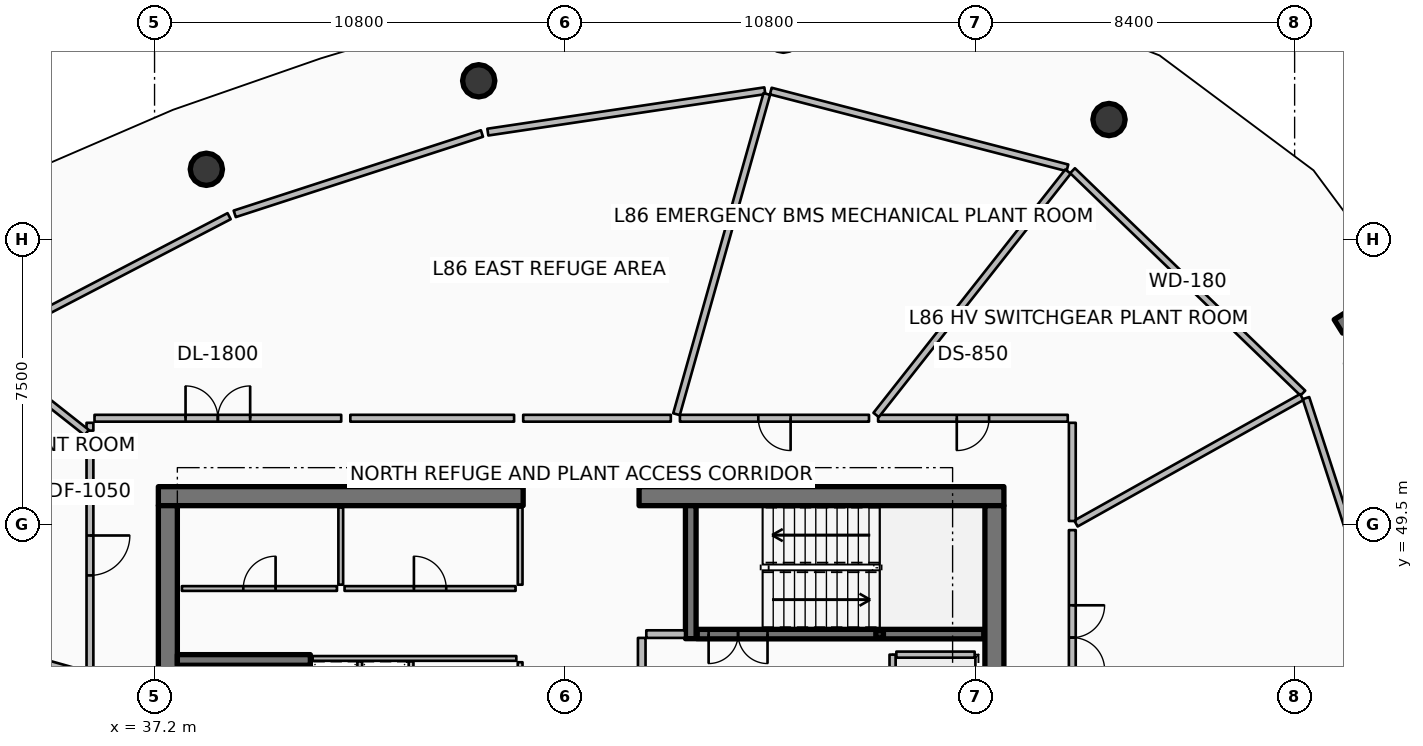
"""IFC4 building model, lengths in metres.
Left out: names, types, materials, properties, quantities, classifications, styles, units other than length and angle.
Written with IfcOpenShell. Run it as: python <this file> out.ifc"""

import sys

from ifc_helpers import new_model, si_unit, direction, frame, frame_2d, origin, origin_2d, place, context, subcontext, project, spatial, rectangle, hollow_rectangle, circle, extrude, element, fill, save


model = new_model("IFC4")
c1 = context("Model", 3, precision=1e-05, world=origin(), true_north=direction((0.0, 1.0)))
c2 = subcontext(c1, "Body", "Model", "MODEL_VIEW")
j1 = project(units=[si_unit("LENGTHUNIT", "METRE"), si_unit("PLANEANGLEUNIT", "RADIAN")], contexts=[c1])
p1 = place(None, origin())
s1 = spatial("IfcSite", under=j1, at=p1, CompositionType="ELEMENT")
p2 = place(p1, origin())
s2 = spatial("IfcBuilding", under=s1, at=p2, CompositionType="ELEMENT")
p3 = place(p2, frame((0.0, 0.0, 343.1)))
s3 = spatial("IfcBuildingStorey", under=s2, at=p3, CompositionType="ELEMENT", Elevation=343.1)
p4 = place(p3, frame((37.3, 50.25, 0.0), z_axis=(0.0, 0.0, 1.0), x_axis=(1.0, 0.0, 0.0)))
e1 = element("IfcWall", 1, at=p4, inside=s3, PredefinedType="SHEAR", context=c2, shape_type="SweptSolid", body=[
    extrude(rectangle(XDim=9.6, YDim=0.5, at=frame_2d((4.8, 0.0))), origin(), (0.0, 0.0, 1.0), 4.2),
])
p5 = place(p3, frame((49.95, 50.25, 0.0), z_axis=(0.0, 0.0, 1.0), x_axis=(1.0, 0.0, 0.0)))
e2 = element("IfcWall", 2, at=p5, inside=s3, PredefinedType="SHEAR", context=c2, shape_type="SweptSolid", body=[
    extrude(rectangle(XDim=9.6, YDim=0.5, at=frame_2d((4.8, 0.0))), origin(), (0.0, 0.0, 1.0), 4.2),
])
for number, where, z_axis, x_axis in (
    (3, (37.55, 34.0, 0.0), (0.0, 0.0, 1.0), (0.0, 1.0, 0.0)),
    (4, (59.3, 34.0, 0.0), (0.0, 0.0, 1.0), (0.0, 1.0, 0.0)),
):
    element("IfcWall", number, at=place(p3, frame(where, z_axis=z_axis, x_axis=x_axis)), inside=s3, PredefinedType="SHEAR", context=c2, shape_type="SweptSolid", body=[
        extrude(rectangle(XDim=16.0, YDim=0.5, at=frame_2d((8.0, 0.0))), origin(), (0.0, 0.0, 1.0), 4.2),
    ])
for number, where, z_axis, x_axis in (
    (5, (37.8, 45.94, 0.0), (0.0, 0.0, 1.0), (1.0, 0.0, 0.0)),
    (6, (51.31, 46.5, 0.0), (0.0, 0.0, 1.0), (0.0, 1.0, 0.0)),
):
    element("IfcWall", number, at=place(p3, frame(where, z_axis=z_axis, x_axis=x_axis)), inside=s3, PredefinedType="SHEAR", context=c2, shape_type="SweptSolid", body=[
        extrude(rectangle(XDim=3.5, YDim=0.28, at=frame_2d((1.75, 0.0))), origin(), (0.0, 0.0, 1.0), 4.2),
    ])
p6 = place(p3, frame((56.28, 46.62, 0.0), z_axis=(0.0, 0.0, 1.0), x_axis=(1.0, 0.0, 0.0)))
e7 = element("IfcColumn", 7, at=p6, inside=s3, PredefinedType="COLUMN", context=c2, shape_type="SweptSolid", body=[
    extrude(hollow_rectangle(XDim=0.2, YDim=0.2, WallThickness=0.01, InnerFilletRadius=0.01, OuterFilletRadius=0.02, at=origin_2d()), origin(), (0.0, 0.0, 1.0), 1.895),
])
p7 = place(p3, frame((68.353, 54.718, 0.0), z_axis=(0.0, 0.0, 1.0), x_axis=(0.848053161125, 0.529911158502, 0.0)))
e8 = element("IfcWall", 8, at=p7, inside=s3, PredefinedType="SOLIDWALL", context=c2, shape_type="SweptSolid", body=[
    extrude(rectangle(XDim=3.5, YDim=0.42, at=frame_2d((1.75, 0.0))), origin(), (0.0, 0.0, 1.0), 4.2),
])
for number, where, z_axis, x_axis in (
    (9, (62.316, 60.159, 0.0), (0.0, 0.0, 1.0), (1.0, 0.0, 0.0)),
    (10, (45.73, 61.179, 0.0), (0.0, 0.0, 1.0), (1.0, 0.0, 0.0)),
    (11, (38.563, 58.851, 0.0), (0.0, 0.0, 1.0), (1.0, 0.0, 0.0)),
):
    element("IfcColumn", number, at=place(p3, frame(where, z_axis=z_axis, x_axis=x_axis)), inside=s3, PredefinedType="COLUMN", context=c2, shape_type="SweptSolid", body=[
        extrude(circle(Radius=0.425, at=origin_2d()), origin(), (0.0, 0.0, 1.0), 3.94),
    ])
p8 = place(p3, frame((41.18, 38.22, 0.0), z_axis=(0.0, 0.0, 1.0), x_axis=(0.0, 1.0, 0.0)))
e12 = element("IfcWall", 12, at=p8, inside=s3, PredefinedType="SOLIDWALL", context=c2, shape_type="SweptSolid", body=[
    extrude(rectangle(XDim=7.56, YDim=0.25, at=frame_2d((3.78, 0.0))), origin(), (0.0, 0.0, 1.0), 3.94),
])
p9 = place(p8, frame((0.3, 0.0, 0.0)))
e13 = element("IfcOpeningElement", 13, at=p9, cuts=e12, PredefinedType="OPENING", context=c2, shape_type="SweptSolid", body=[
    extrude(rectangle(XDim=1.55, YDim=2.15, at=frame_2d((0.775, 1.075))), frame((0.0, 0.135, 0.0), z_axis=(0.0, -1.0, 0.0), x_axis=(1.0, 0.0, 0.0)), (0.0, 0.0, 1.0), 0.27),
])
p10 = place(p3, frame((51.48, 46.62, 0.0), z_axis=(0.0, 0.0, 1.0), x_axis=(1.0, 0.0, 0.0)))
e14 = element("IfcWall", 14, at=p10, inside=s3, PredefinedType="SOLIDWALL", context=c2, shape_type="SweptSolid", body=[
    extrude(rectangle(XDim=7.54, YDim=0.25, at=frame_2d((3.77, 0.0))), origin(), (0.0, 0.0, 1.0), 3.94),
])
p11 = place(p10, frame((0.3, 0.0, 0.0)))
e15 = element("IfcOpeningElement", 15, at=p11, cuts=e14, PredefinedType="OPENING", context=c2, shape_type="SweptSolid", body=[
    extrude(rectangle(XDim=1.55, YDim=2.15, at=frame_2d((0.775, 1.075))), frame((0.0, 0.135, 0.0), z_axis=(0.0, -1.0, 0.0), x_axis=(1.0, 0.0, 0.0)), (0.0, 0.0, 1.0), 0.27),
])
p12 = place(p3, frame((56.62, 46.08, 0.0), z_axis=(0.0, 0.0, 1.0), x_axis=(0.0, -1.0, 0.0)))
e16 = element("IfcWall", 16, at=p12, inside=s3, PredefinedType="PARTITIONING", context=c2, shape_type="SweptSolid", body=[
    extrude(rectangle(XDim=2.46, YDim=0.16, at=frame_2d((1.23, 0.0))), origin(), (0.0, 0.0, 1.0), 3.94),
])
p13 = place(p12, frame((0.68, 0.0, 0.0)))
e17 = element("IfcOpeningElement", 17, at=p13, cuts=e16, PredefinedType="OPENING", context=c2, shape_type="SweptSolid", body=[
    extrude(rectangle(XDim=1.1, YDim=2.1, at=frame_2d((0.55, 1.05))), frame((0.0, 0.09, 0.0), z_axis=(0.0, -1.0, 0.0), x_axis=(1.0, 0.0, 0.0)), (0.0, 0.0, 1.0), 0.18),
])
p14 = place(p3, frame((56.72, 46.08, 0.0), z_axis=(0.0, 0.0, 1.0), x_axis=(1.0, 0.0, 0.0)))
e18 = element("IfcWall", 18, at=p14, inside=s3, PredefinedType="PARTITIONING", context=c2, shape_type="SweptSolid", body=[
    extrude(rectangle(XDim=2.06, YDim=0.16, at=frame_2d((1.03, 0.0))), origin(), (0.0, 0.0, 1.0), 3.94),
])
for number, where, z_axis, x_axis in (
    (19, (46.82, 47.92, 0.0), (0.0, 0.0, 1.0), (0.0, 1.0, 0.0)),
    (20, (42.1, 47.92, 0.0), (0.0, 0.0, 1.0), (0.0, 1.0, 0.0)),
):
    element("IfcWall", number, at=place(p3, frame(where, z_axis=z_axis, x_axis=x_axis)), inside=s3, PredefinedType="PARTITIONING", context=c2, shape_type="SweptSolid", body=[
        extrude(rectangle(XDim=2.03, YDim=0.125, at=frame_2d((1.015, 0.0))), origin(), (0.0, 0.0, 1.0), 3.38),
    ])
p15 = place(p3, frame((37.92, 47.82, 0.0), z_axis=(0.0, 0.0, 1.0), x_axis=(1.0, 0.0, 0.0)))
e21 = element("IfcWall", 21, at=p15, inside=s3, PredefinedType="PARTITIONING", context=c2, shape_type="SweptSolid", body=[
    extrude(rectangle(XDim=4.08, YDim=0.125, at=frame_2d((2.04, 0.0))), origin(), (0.0, 0.0, 1.0), 3.38),
])
p16 = place(p15, frame((1.615, 0.0, 0.0)))
e22 = element("IfcOpeningElement", 22, at=p16, cuts=e21, PredefinedType="OPENING", context=c2, shape_type="SweptSolid", body=[
    extrude(rectangle(XDim=0.85, YDim=2.06, at=frame_2d((0.425, 1.03))), frame((0.0, 0.073, 0.0), z_axis=(0.0, -1.0, 0.0), x_axis=(1.0, 0.0, 0.0)), (0.0, 0.0, 1.0), 0.145),
])
p17 = place(p3, frame((42.2, 47.82, 0.0), z_axis=(0.0, 0.0, 1.0), x_axis=(1.0, 0.0, 0.0)))
e23 = element("IfcWall", 23, at=p17, inside=s3, PredefinedType="PARTITIONING", context=c2, shape_type="SweptSolid", body=[
    extrude(rectangle(XDim=4.5, YDim=0.125, at=frame_2d((2.25, 0.0))), origin(), (0.0, 0.0, 1.0), 3.38),
])
p18 = place(p17, frame((1.825, 0.0, 0.0)))
e24 = element("IfcOpeningElement", 24, at=p18, cuts=e23, PredefinedType="OPENING", context=c2, shape_type="SweptSolid", body=[
    extrude(rectangle(XDim=0.85, YDim=2.06, at=frame_2d((0.425, 1.03))), frame((0.0, 0.073, 0.0), z_axis=(0.0, -1.0, 0.0), x_axis=(1.0, 0.0, 0.0)), (0.0, 0.0, 1.0), 0.145),
])
p19 = place(p3, frame((50.14, 46.62, 0.0), z_axis=(0.0, 0.0, 1.0), x_axis=(1.0, 0.0, 0.0)))
e25 = element("IfcWall", 25, at=p19, inside=s3, PredefinedType="PARTITIONING", context=c2, shape_type="SweptSolid", body=[
    extrude(rectangle(XDim=1.02, YDim=0.2, at=frame_2d((0.51, 0.0))), origin(), (0.0, 0.0, 1.0), 3.94),
])
p20 = place(p3, frame((50.02, 43.22, 0.0), z_axis=(0.0, 0.0, 1.0), x_axis=(0.0, 1.0, 0.0)))
e26 = element("IfcWall", 26, at=p20, inside=s3, PredefinedType="PARTITIONING", context=c2, shape_type="SweptSolid", body=[
    extrude(rectangle(XDim=3.3, YDim=0.2, at=frame_2d((1.65, 0.0))), origin(), (0.0, 0.0, 1.0), 3.94),
])
p21 = place(p20, frame((1.125, 0.0, 0.0)))
e27 = element("IfcOpeningElement", 27, at=p21, cuts=e26, PredefinedType="OPENING", context=c2, shape_type="SweptSolid", body=[
    extrude(rectangle(XDim=1.05, YDim=2.1, at=frame_2d((0.525, 1.05))), frame((0.0, 0.11, 0.0), z_axis=(0.0, -1.0, 0.0), x_axis=(1.0, 0.0, 0.0)), (0.0, 0.0, 1.0), 0.22),
])
p22 = place(p3, frame((41.36, 45.98, 0.0), z_axis=(0.0, 0.0, 1.0), x_axis=(1.0, 0.0, 0.0)))
e28 = element("IfcWall", 28, at=p22, inside=s3, PredefinedType="PARTITIONING", context=c2, shape_type="SweptSolid", body=[
    extrude(rectangle(XDim=5.36, YDim=0.125, at=frame_2d((2.68, 0.0))), origin(), (0.0, 0.0, 1.0), 3.38),
])
p23 = place(p3, frame((42.6, 44.35, 0.0), z_axis=(0.0, 0.0, 1.0), x_axis=(0.0, 1.0, 0.0)))
e29 = element("IfcWall", 29, at=p23, inside=s3, PredefinedType="PARTITIONING", context=c2, shape_type="SweptSolid", body=[
    extrude(rectangle(XDim=1.55, YDim=0.125, at=frame_2d((0.775, 0.0))), origin(), (0.0, 0.0, 1.0), 3.38),
])
p24 = place(p3, frame((43.95, 41.58, 0.0), z_axis=(0.0, 0.0, 1.0), x_axis=(0.0, 1.0, 0.0)))
e30 = element("IfcWall", 30, at=p24, inside=s3, PredefinedType="PARTITIONING", context=c2, shape_type="SweptSolid", body=[
    extrude(rectangle(XDim=4.32, YDim=0.125, at=frame_2d((2.16, 0.0))), origin(), (0.0, 0.0, 1.0), 3.38),
])
p25 = place(p3, frame((46.82, 43.83, 0.0), z_axis=(0.0, 0.0, 1.0), x_axis=(0.0, 1.0, 0.0)))
e31 = element("IfcWall", 31, at=p25, inside=s3, PredefinedType="PARTITIONING", context=c2, shape_type="SweptSolid", body=[
    extrude(rectangle(XDim=2.05, YDim=0.125, at=frame_2d((1.025, 0.0))), origin(), (0.0, 0.0, 1.0), 3.38),
])
p26 = place(p25, frame((0.6, 0.0, 0.0)))
e32 = element("IfcOpeningElement", 32, at=p26, cuts=e31, PredefinedType="OPENING", context=c2, shape_type="SweptSolid", body=[
    extrude(rectangle(XDim=0.85, YDim=2.06, at=frame_2d((0.425, 1.03))), frame((0.0, 0.073, 0.0), z_axis=(0.0, -1.0, 0.0), x_axis=(1.0, 0.0, 0.0)), (0.0, 0.0, 1.0), 0.145),
])
p27 = place(p3, frame((67.417, 52.962, 0.0), z_axis=(0.0, 0.0, 1.0), x_axis=(-0.719358516059, 0.694638989241, 0.0)))
e33 = element("IfcWall", 33, at=p27, inside=s3, PredefinedType="PARTITIONING", context=c2, shape_type="SweptSolid", body=[
    extrude(rectangle(XDim=8.425, YDim=0.18, at=frame_2d((4.212, 0.0))), origin(), (0.0, 0.0, 1.0), 2.933),
])
p28 = place(p3, frame((61.221, 58.889, 0.0), z_axis=(0.0, 0.0, 1.0), x_axis=(-0.96812020229, 0.250486075298, 0.0)))
e34 = element("IfcWall", 34, at=p28, inside=s3, PredefinedType="PARTITIONING", context=c2, shape_type="SweptSolid", body=[
    extrude(rectangle(XDim=8.062, YDim=0.18, at=frame_2d((4.031, 0.0))), origin(), (0.0, 0.0, 1.0), 2.933),
])
p29 = place(p3, frame((53.26, 60.917, 0.0), z_axis=(0.0, 0.0, 1.0), x_axis=(-0.989035992024, -0.147674664315, 0.0)))
e35 = element("IfcWall", 35, at=p29, inside=s3, PredefinedType="PARTITIONING", context=c2, shape_type="SweptSolid", body=[
    extrude(rectangle(XDim=7.37, YDim=0.18, at=frame_2d((3.685, 0.0))), origin(), (0.0, 0.0, 1.0), 2.933),
])
p30 = place(p3, frame((45.815, 59.792, 0.0), z_axis=(0.0, 0.0, 1.0), x_axis=(-0.95105793387, -0.309012631495, 0.0)))
e36 = element("IfcWall", 36, at=p30, inside=s3, PredefinedType="PARTITIONING", context=c2, shape_type="SweptSolid", body=[
    extrude(rectangle(XDim=6.84, YDim=0.18, at=frame_2d((3.42, 0.0))), origin(), (0.0, 0.0, 1.0), 2.933),
])
p31 = place(p3, frame((39.163, 57.617, 0.0), z_axis=(0.0, 0.0, 1.0), x_axis=(-0.886951970108, -0.461861670548, 0.0)))
e37 = element("IfcWall", 37, at=p31, inside=s3, PredefinedType="PARTITIONING", context=c2, shape_type="SweptSolid", body=[
    extrude(rectangle(XDim=7.37, YDim=0.18, at=frame_2d((3.685, 0.0))), origin(), (0.0, 0.0, 1.0), 2.933),
])
p32 = place(p3, frame((70.141, 44.699, 0.0), z_axis=(0.0, 0.0, 1.0), x_axis=(-0.309030537088, 0.951052115894, 0.0)))
e38 = element("IfcWall", 38, at=p32, inside=s3, PredefinedType="PARTITIONING", context=c2, shape_type="SweptSolid", body=[
    extrude(rectangle(XDim=8.549, YDim=0.18, at=frame_2d((4.274, 0.0))), origin(), (0.0, 0.0, 1.0), 2.933),
])
p33 = place(p3, frame((50.785, 52.3, 0.0), z_axis=(0.0, 0.0, 1.0), x_axis=(-1.0, 0.0, 0.0)))
e39 = element("IfcWall", 39, at=p33, inside=s3, PredefinedType="PARTITIONING", context=c2, shape_type="SweptSolid", body=[
    extrude(rectangle(XDim=3.884, YDim=0.18, at=frame_2d((1.942, 0.0))), origin(), (0.0, 0.0, 1.0), 2.933),
])
p34 = place(p3, frame((46.661, 52.3, 0.0), z_axis=(0.0, 0.0, 1.0), x_axis=(-1.0, 0.0, 0.0)))
e40 = element("IfcWall", 40, at=p34, inside=s3, PredefinedType="PARTITIONING", context=c2, shape_type="SweptSolid", body=[
    extrude(rectangle(XDim=4.309, YDim=0.18, at=frame_2d((2.155, 0.0))), origin(), (0.0, 0.0, 1.0), 2.933),
])
p35 = place(p3, frame((42.112, 52.3, 0.0), z_axis=(0.0, 0.0, 1.0), x_axis=(-1.0, 0.0, 0.0)))
e41 = element("IfcWall", 41, at=p35, inside=s3, PredefinedType="PARTITIONING", context=c2, shape_type="SweptSolid", body=[
    extrude(rectangle(XDim=6.492, YDim=0.18, at=frame_2d((3.246, 0.0))), origin(), (0.0, 0.0, 1.0), 2.933),
])
p36 = place(p35, frame((2.396, 0.0, 0.0)))
e42 = element("IfcOpeningElement", 42, at=p36, cuts=e41, PredefinedType="OPENING", context=c2, shape_type="SweptSolid", body=[
    extrude(rectangle(XDim=1.7, YDim=2.15, at=frame_2d((0.85, 1.075))), frame((0.0, 0.1, 0.0), z_axis=(0.0, -1.0, 0.0), x_axis=(1.0, 0.0, 0.0)), (0.0, 0.0, 1.0), 0.2),
])
p37 = place(p3, frame((35.5, 52.18, 0.0), z_axis=(0.0, 0.0, 1.0), x_axis=(0.0, -1.0, 0.0)))
e43 = element("IfcWall", 43, at=p37, inside=s3, PredefinedType="PARTITIONING", context=c2, shape_type="SweptSolid", body=[
    extrude(rectangle(XDim=0.206, YDim=0.18, at=frame_2d((0.103, 0.0))), origin(), (0.0, 0.0, 1.0), 2.933),
])
p38 = place(p3, frame((50.935, 52.406, 0.0), z_axis=(0.0, 0.0, 1.0), x_axis=(0.271427049977, 0.962459015512, 0.0)))
e44 = element("IfcWall", 44, at=p38, inside=s3, PredefinedType="PARTITIONING", context=c2, shape_type="SweptSolid", body=[
    extrude(rectangle(XDim=8.755, YDim=0.18, at=frame_2d((4.378, 0.0))), origin(), (0.0, 0.0, 1.0), 2.933),
])
p39 = place(p3, frame((35.414, 51.922, 0.0), z_axis=(0.0, 0.0, 1.0), x_axis=(-0.78533621982, 0.619069480622, 0.0)))
e45 = element("IfcWall", 45, at=p39, inside=s3, PredefinedType="PARTITIONING", context=c2, shape_type="SweptSolid", body=[
    extrude(rectangle(XDim=3.54, YDim=0.18, at=frame_2d((1.77, 0.0))), origin(), (0.0, 0.0, 1.0), 2.933),
])
p40 = place(p3, frame((35.5, 51.734, 0.0), z_axis=(0.0, 0.0, 1.0), x_axis=(0.0, -1.0, 0.0)))
e46 = element("IfcWall", 46, at=p40, inside=s3, PredefinedType="PARTITIONING", context=c2, shape_type="SweptSolid", body=[
    extrude(rectangle(XDim=6.089, YDim=0.18, at=frame_2d((3.044, 0.0))), origin(), (0.0, 0.0, 1.0), 2.933),
])
p41 = place(p40, frame((2.519, 0.0, 0.0)))
e47 = element("IfcOpeningElement", 47, at=p41, cuts=e46, PredefinedType="OPENING", context=c2, shape_type="SweptSolid", body=[
    extrude(rectangle(XDim=1.05, YDim=2.1, at=frame_2d((0.525, 1.05))), frame((0.0, 0.1, 0.0), z_axis=(0.0, -1.0, 0.0), x_axis=(1.0, 0.0, 0.0)), (0.0, 0.0, 1.0), 0.2),
])
p42 = place(p3, frame((35.394, 45.555, 0.0), z_axis=(0.0, 0.0, 1.0), x_axis=(-0.962460337435, 0.2714223625, 0.0)))
e48 = element("IfcWall", 48, at=p42, inside=s3, PredefinedType="PARTITIONING", context=c2, shape_type="SweptSolid", body=[
    extrude(rectangle(XDim=8.283, YDim=0.18, at=frame_2d((4.142, 0.0))), origin(), (0.0, 0.0, 1.0), 2.933),
])
p43 = place(p3, frame((61.35, 43.7, 0.0), z_axis=(0.0, 0.0, 1.0), x_axis=(0.0, 1.0, 0.0)))
e49 = element("IfcWall", 49, at=p43, inside=s3, PredefinedType="PARTITIONING", context=c2, shape_type="SweptSolid", body=[
    extrude(rectangle(XDim=5.656, YDim=0.18, at=frame_2d((2.828, 0.0))), origin(), (0.0, 0.0, 1.0), 2.933),
])
p44 = place(p43, frame((1.978, 0.0, 0.0)))
e50 = element("IfcOpeningElement", 50, at=p44, cuts=e49, PredefinedType="OPENING", context=c2, shape_type="SweptSolid", body=[
    extrude(rectangle(XDim=1.7, YDim=2.15, at=frame_2d((0.85, 1.075))), frame((0.0, 0.1, 0.0), z_axis=(0.0, -1.0, 0.0), x_axis=(1.0, 0.0, 0.0)), (0.0, 0.0, 1.0), 0.2),
])
p45 = place(p3, frame((61.446, 49.53, 0.0), z_axis=(0.0, 0.0, 1.0), x_axis=(0.872491341717, 0.488629571995, 0.0)))
e51 = element("IfcWall", 51, at=p45, inside=s3, PredefinedType="PARTITIONING", context=c2, shape_type="SweptSolid", body=[
    extrude(rectangle(XDim=6.809, YDim=0.18, at=frame_2d((3.405, 0.0))), origin(), (0.0, 0.0, 1.0), 2.933),
])
p46 = place(p3, frame((61.35, 49.596, 0.0), z_axis=(0.0, 0.0, 1.0), x_axis=(0.0, 1.0, 0.0)))
e52 = element("IfcWall", 52, at=p46, inside=s3, PredefinedType="PARTITIONING", context=c2, shape_type="SweptSolid", body=[
    extrude(rectangle(XDim=2.583, YDim=0.18, at=frame_2d((1.292, 0.0))), origin(), (0.0, 0.0, 1.0), 2.933),
])
p47 = place(p3, frame((61.23, 52.3, 0.0), z_axis=(0.0, 0.0, 1.0), x_axis=(-1.0, 0.0, 0.0)))
e53 = element("IfcWall", 53, at=p47, inside=s3, PredefinedType="PARTITIONING", context=c2, shape_type="SweptSolid", body=[
    extrude(rectangle(XDim=4.99, YDim=0.18, at=frame_2d((2.495, 0.0))), origin(), (0.0, 0.0, 1.0), 2.933),
])
p48 = place(p47, frame((2.07, 0.0, 0.0)))
e54 = element("IfcOpeningElement", 54, at=p48, cuts=e53, PredefinedType="OPENING", context=c2, shape_type="SweptSolid", body=[
    extrude(rectangle(XDim=0.85, YDim=2.06, at=frame_2d((0.425, 1.03))), frame((0.0, 0.1, 0.0), z_axis=(0.0, -1.0, 0.0), x_axis=(1.0, 0.0, 0.0)), (0.0, 0.0, 1.0), 0.2),
])
p49 = place(p3, frame((56.188, 52.386, 0.0), z_axis=(0.0, 0.0, 1.0), x_axis=(0.619086016157, 0.785323184809, 0.0)))
e55 = element("IfcWall", 55, at=p49, inside=s3, PredefinedType="PARTITIONING", context=c2, shape_type="SweptSolid", body=[
    extrude(rectangle(XDim=8.155, YDim=0.18, at=frame_2d((4.078, 0.0))), origin(), (0.0, 0.0, 1.0), 2.933),
])
p50 = place(p3, frame((56.0, 52.3, 0.0), z_axis=(0.0, 0.0, 1.0), x_axis=(-1.0, 0.0, 0.0)))
e56 = element("IfcWall", 56, at=p50, inside=s3, PredefinedType="PARTITIONING", context=c2, shape_type="SweptSolid", body=[
    extrude(rectangle(XDim=4.975, YDim=0.18, at=frame_2d((2.488, 0.0))), origin(), (0.0, 0.0, 1.0), 2.933),
])
p51 = place(p50, frame((2.062, 0.0, 0.0)))
e57 = element("IfcOpeningElement", 57, at=p51, cuts=e56, PredefinedType="OPENING", context=c2, shape_type="SweptSolid", body=[
    extrude(rectangle(XDim=0.85, YDim=2.06, at=frame_2d((0.425, 1.03))), frame((0.0, 0.1, 0.0), z_axis=(0.0, -1.0, 0.0), x_axis=(1.0, 0.0, 0.0)), (0.0, 0.0, 1.0), 0.2),
])
p52 = place(p11, origin())
e58 = element("IfcDoor", 58, at=p52, inside=s3, OperationType="DOUBLE_DOOR_SINGLE_SWING", PredefinedType="DOOR", context=c2, shape_type="SweptSolid", body=[
    extrude(rectangle(XDim=1.55, YDim=2.15, at=frame_2d((0.775, 1.075))), frame((0.0, 0.025, 0.0), z_axis=(0.0, -1.0, 0.0), x_axis=(1.0, 0.0, 0.0)), (0.0, 0.0, 1.0), 0.05),
])
fill(e15, e58)
p53 = place(p16, origin())
e59 = element("IfcDoor", 59, at=p53, inside=s3, OperationType="SINGLE_SWING_RIGHT", PredefinedType="DOOR", context=c2, shape_type="SweptSolid", body=[
    extrude(rectangle(XDim=0.85, YDim=2.06, at=frame_2d((0.425, 1.03))), frame((0.0, 0.025, 0.0), z_axis=(0.0, -1.0, 0.0), x_axis=(1.0, 0.0, 0.0)), (0.0, 0.0, 1.0), 0.05),
])
fill(e22, e59)
p54 = place(p18, origin())
e60 = element("IfcDoor", 60, at=p54, inside=s3, OperationType="SINGLE_SWING_LEFT", PredefinedType="DOOR", context=c2, shape_type="SweptSolid", body=[
    extrude(rectangle(XDim=0.85, YDim=2.06, at=frame_2d((0.425, 1.03))), frame((0.0, 0.025, 0.0), z_axis=(0.0, -1.0, 0.0), x_axis=(1.0, 0.0, 0.0)), (0.0, 0.0, 1.0), 0.05),
])
fill(e24, e60)
p55 = place(p36, origin())
e61 = element("IfcDoor", 61, at=p55, inside=s3, OperationType="DOUBLE_DOOR_SINGLE_SWING", PredefinedType="DOOR", context=c2, shape_type="SweptSolid", body=[
    extrude(rectangle(XDim=1.7, YDim=2.15, at=frame_2d((0.85, 1.075))), frame((0.0, 0.025, 0.0), z_axis=(0.0, -1.0, 0.0), x_axis=(1.0, 0.0, 0.0)), (0.0, 0.0, 1.0), 0.05),
])
fill(e42, e61)
p56 = place(p41, origin())
e62 = element("IfcDoor", 62, at=p56, inside=s3, OperationType="SINGLE_SWING_LEFT", PredefinedType="DOOR", context=c2, shape_type="SweptSolid", body=[
    extrude(rectangle(XDim=1.05, YDim=2.1, at=frame_2d((0.525, 1.05))), frame((0.0, 0.025, 0.0), z_axis=(0.0, -1.0, 0.0), x_axis=(1.0, 0.0, 0.0)), (0.0, 0.0, 1.0), 0.05),
])
fill(e47, e62)
p57 = place(p44, origin())
e63 = element("IfcDoor", 63, at=p57, inside=s3, OperationType="DOUBLE_DOOR_SINGLE_SWING", PredefinedType="DOOR", context=c2, shape_type="SweptSolid", body=[
    extrude(rectangle(XDim=1.7, YDim=2.15, at=frame_2d((0.85, 1.075))), frame((0.0, 0.025, 0.0), z_axis=(0.0, -1.0, 0.0), x_axis=(1.0, 0.0, 0.0)), (0.0, 0.0, 1.0), 0.05),
])
fill(e50, e63)
p58 = place(p48, origin())
e64 = element("IfcDoor", 64, at=p58, inside=s3, OperationType="SINGLE_SWING_RIGHT", PredefinedType="DOOR", context=c2, shape_type="SweptSolid", body=[
    extrude(rectangle(XDim=0.85, YDim=2.06, at=frame_2d((0.425, 1.03))), frame((0.0, 0.025, 0.0), z_axis=(0.0, -1.0, 0.0), x_axis=(1.0, 0.0, 0.0)), (0.0, 0.0, 1.0), 0.05),
])
fill(e54, e64)
p59 = place(p51, origin())
e65 = element("IfcDoor", 65, at=p59, inside=s3, OperationType="SINGLE_SWING_LEFT", PredefinedType="DOOR", context=c2, shape_type="SweptSolid", body=[
    extrude(rectangle(XDim=0.85, YDim=2.06, at=frame_2d((0.425, 1.03))), frame((0.0, 0.025, 0.0), z_axis=(0.0, -1.0, 0.0), x_axis=(1.0, 0.0, 0.0)), (0.0, 0.0, 1.0), 0.05),
])
fill(e57, e65)
save(model, sys.argv[1])
